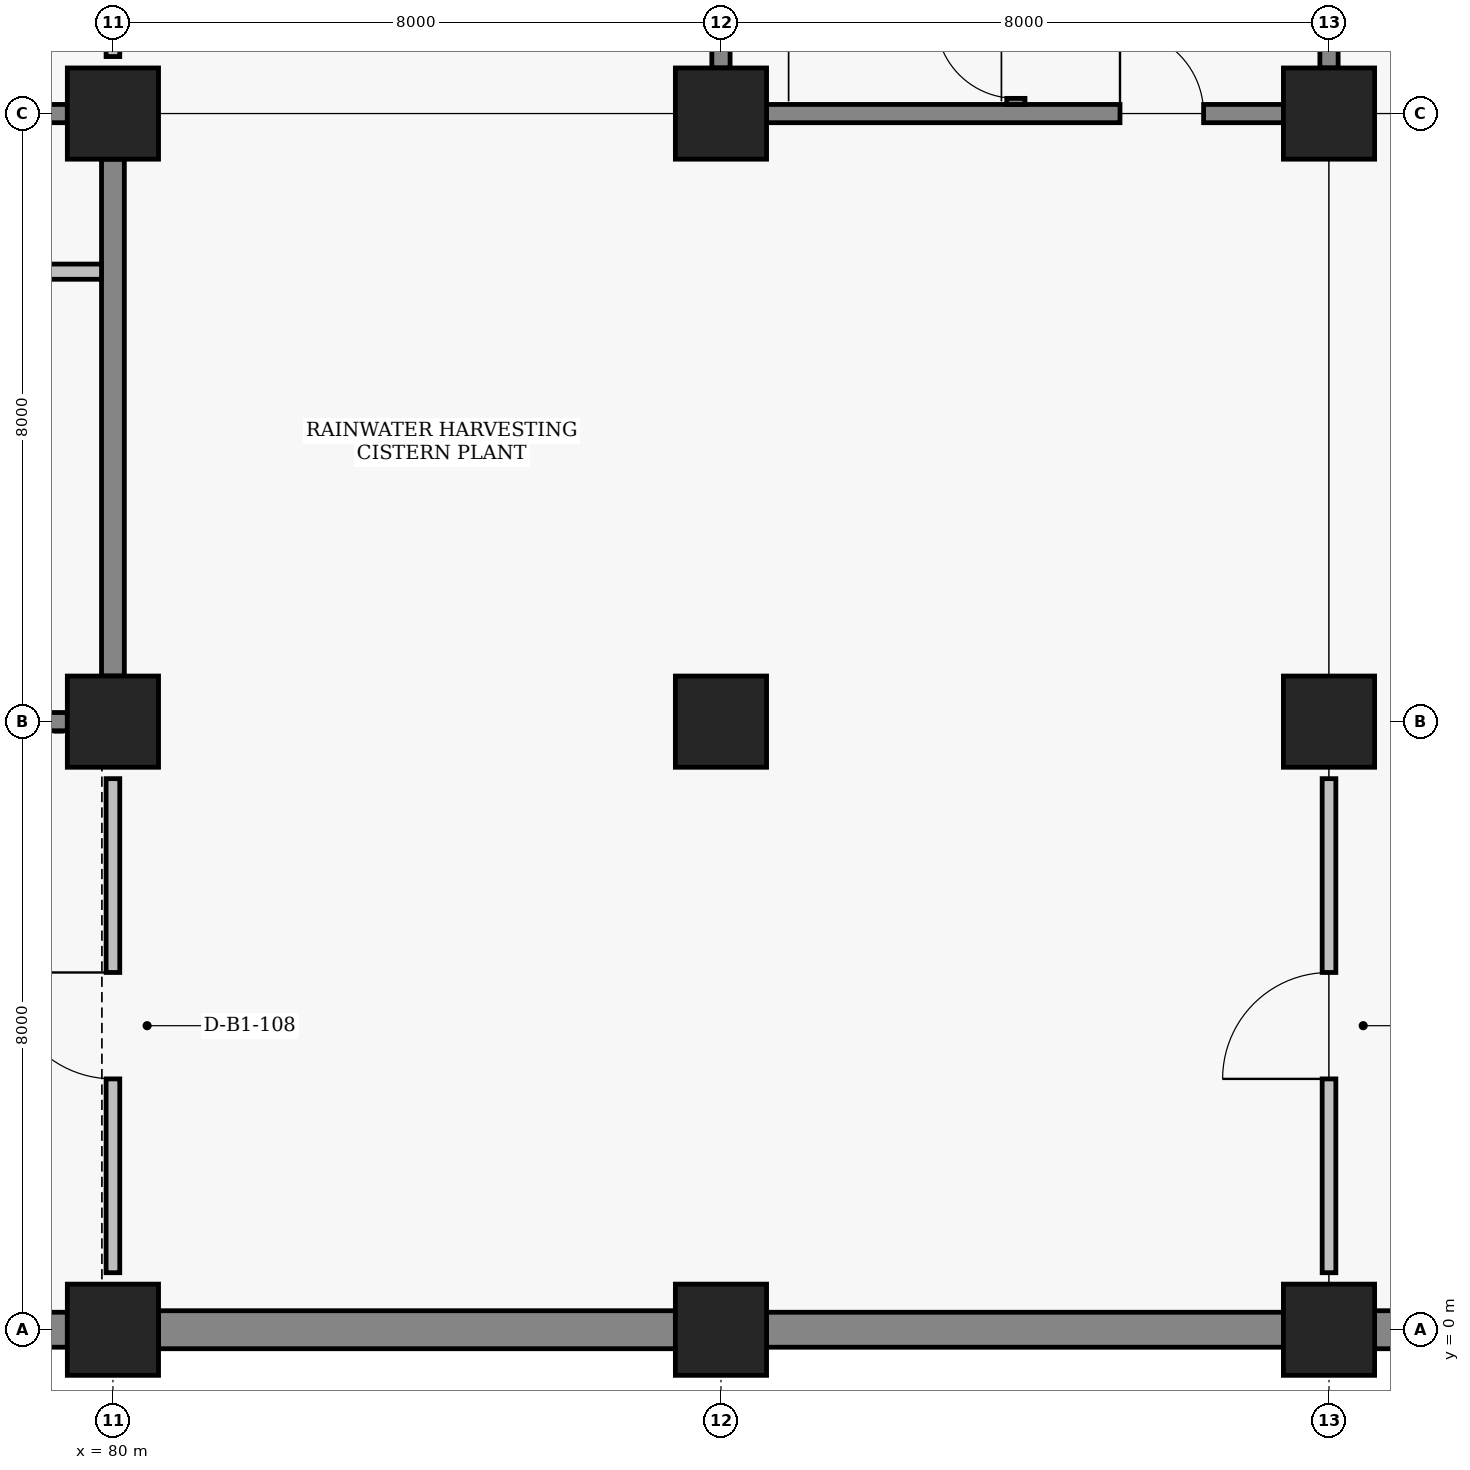
"""IFC4 building model, lengths in metres.
Left out: names, types, materials, properties, quantities, classifications, styles, units other than length and angle.
Written with IfcOpenShell. Run it as: python <this file> out.ifc"""

import sys

from ifc_helpers import new_model, si_unit, direction, frame, frame_2d, origin, origin_2d, place, context, subcontext, project, spatial, rectangle, extrude, element, fill, save


model = new_model("IFC4")
c1 = context("Model", 3, precision=1e-05, world=origin(), true_north=direction((0.0, 1.0)))
c2 = subcontext(c1, "Body", "Model", "MODEL_VIEW")
j1 = project(units=[si_unit("LENGTHUNIT", "METRE"), si_unit("PLANEANGLEUNIT", "RADIAN")], contexts=[c1])
p1 = place(None, origin())
s1 = spatial("IfcSite", under=j1, at=p1, CompositionType="ELEMENT")
p2 = place(p1, origin())
s2 = spatial("IfcBuilding", under=s1, at=p2, CompositionType="ELEMENT")
p3 = place(p2, frame((0.0, 0.0, -5.4)))
s3 = spatial("IfcBuildingStorey", under=s2, at=p3, CompositionType="ELEMENT", Elevation=-5.4)
for number, where, z_axis, x_axis in (
    (1, (80.0, 0.0, 0.0), (0.0, 0.0, 1.0), (1.0, 0.0, 0.0)),
    (2, (80.0, 8.0, 0.0), (0.0, 0.0, 1.0), (1.0, 0.0, 0.0)),
    (3, (80.0, 16.0, 0.0), (0.0, 0.0, 1.0), (1.0, 0.0, 0.0)),
    (4, (88.0, 0.0, 0.0), (0.0, 0.0, 1.0), (1.0, 0.0, 0.0)),
    (5, (88.0, 8.0, 0.0), (0.0, 0.0, 1.0), (1.0, 0.0, 0.0)),
    (6, (88.0, 16.0, 0.0), (0.0, 0.0, 1.0), (1.0, 0.0, 0.0)),
    (7, (96.0, 0.0, 0.0), (0.0, 0.0, 1.0), (1.0, 0.0, 0.0)),
    (8, (96.0, 8.0, 0.0), (0.0, 0.0, 1.0), (1.0, 0.0, 0.0)),
    (9, (96.0, 16.0, 0.0), (0.0, 0.0, 1.0), (1.0, 0.0, 0.0)),
):
    element("IfcColumn", number, at=place(p3, frame(where, z_axis=z_axis, x_axis=x_axis)), inside=s3, PredefinedType="COLUMN", context=c2, shape_type="SweptSolid", body=[
        extrude(rectangle(XDim=1.2, YDim=1.2, at=origin_2d()), origin(), (0.0, 0.0, 1.0), 5.4),
    ])
p4 = place(p3, frame((72.6, 0.0, 0.0), z_axis=(0.0, 0.0, 1.0), x_axis=(1.0, 0.0, 0.0)))
e10 = element("IfcWall", 10, at=p4, inside=s3, PredefinedType="STANDARD", context=c2, shape_type="SweptSolid", body=[
    extrude(rectangle(XDim=6.8, YDim=0.46, at=frame_2d((3.4, 0.0))), origin(), (0.0, 0.0, 1.0), 4.29),
])
p5 = place(p3, frame((80.6, 0.0, 0.0), z_axis=(0.0, 0.0, 1.0), x_axis=(1.0, 0.0, 0.0)))
e11 = element("IfcWall", 11, at=p5, inside=s3, PredefinedType="STANDARD", context=c2, shape_type="SweptSolid", body=[
    extrude(rectangle(XDim=6.8, YDim=0.5, at=frame_2d((3.4, 0.0))), origin(), (0.0, 0.0, 1.0), 4.29),
])
p6 = place(p3, frame((88.6, 0.0, 0.0), z_axis=(0.0, 0.0, 1.0), x_axis=(1.0, 0.0, 0.0)))
e12 = element("IfcWall", 12, at=p6, inside=s3, PredefinedType="STANDARD", context=c2, shape_type="SweptSolid", body=[
    extrude(rectangle(XDim=6.8, YDim=0.46, at=frame_2d((3.4, 0.0))), origin(), (0.0, 0.0, 1.0), 4.29),
])
p7 = place(p3, frame((96.6, 0.0, 0.0), z_axis=(0.0, 0.0, 1.0), x_axis=(1.0, 0.0, 0.0)))
e13 = element("IfcWall", 13, at=p7, inside=s3, PredefinedType="STANDARD", context=c2, shape_type="SweptSolid", body=[
    extrude(rectangle(XDim=6.8, YDim=0.5, at=frame_2d((3.4, 0.0))), origin(), (0.0, 0.0, 1.0), 4.29),
])
p8 = place(p3, frame((88.6, 16.0, 0.0), z_axis=(0.0, 0.0, 1.0), x_axis=(1.0, 0.0, 0.0)))
e14 = element("IfcWall", 14, at=p8, inside=s3, PredefinedType="SHEAR", context=c2, shape_type="SweptSolid", body=[
    extrude(rectangle(XDim=6.8, YDim=0.24, at=frame_2d((3.4, 0.0))), origin(), (0.0, 0.0, 1.0), 3.64),
])
p9 = place(p8, frame((4.65, 0.0, 0.0)))
e15 = element("IfcOpeningElement", 15, at=p9, cuts=e14, PredefinedType="OPENING", context=c2, shape_type="SweptSolid", body=[
    extrude(rectangle(XDim=1.1, YDim=2.2, at=frame_2d((0.55, 1.1))), frame((0.0, 0.13, 0.0), z_axis=(0.0, -1.0, 0.0), x_axis=(1.0, 0.0, 0.0)), (0.0, 0.0, 1.0), 0.26),
])
p10 = place(p3, frame((88.0, 16.6, 0.0), z_axis=(0.0, 0.0, 1.0), x_axis=(0.0, 1.0, 0.0)))
e16 = element("IfcWall", 16, at=p10, inside=s3, PredefinedType="SHEAR", context=c2, shape_type="SweptSolid", body=[
    extrude(rectangle(XDim=6.8, YDim=0.24, at=frame_2d((3.4, 0.0))), origin(), (0.0, 0.0, 1.0), 4.39),
])
p11 = place(p3, frame((96.0, 16.6, 0.0), z_axis=(0.0, 0.0, 1.0), x_axis=(0.0, 1.0, 0.0)))
e17 = element("IfcWall", 17, at=p11, inside=s3, PredefinedType="SHEAR", context=c2, shape_type="SweptSolid", body=[
    extrude(rectangle(XDim=6.8, YDim=0.24, at=frame_2d((3.4, 0.0))), origin(), (0.0, 0.0, 1.0), 3.64),
])
p12 = place(p3, frame((91.88, 16.12, 0.0), z_axis=(0.0, 0.0, 1.0), x_axis=(0.0, 1.0, 0.0)))
e18 = element("IfcWall", 18, at=p12, inside=s3, PredefinedType="SHEAR", context=c2, shape_type="SweptSolid", body=[
    extrude(rectangle(XDim=7.76, YDim=0.24, at=frame_2d((3.88, 0.0))), origin(), (0.0, 0.0, 1.0), 4.54),
])
p13 = place(p12, frame((0.08, 0.0, 0.0)))
e19 = element("IfcOpeningElement", 19, at=p13, cuts=e18, PredefinedType="OPENING", context=c2, shape_type="SweptSolid", body=[
    extrude(rectangle(XDim=1.05, YDim=2.15, at=frame_2d((0.525, 1.075))), frame((0.0, 0.13, 0.0), z_axis=(0.0, -1.0, 0.0), x_axis=(1.0, 0.0, 0.0)), (0.0, 0.0, 1.0), 0.26),
])
p14 = place(p3, frame((72.6, 8.0, 0.0), z_axis=(0.0, 0.0, 1.0), x_axis=(1.0, 0.0, 0.0)))
e20 = element("IfcWall", 20, at=p14, inside=s3, PredefinedType="SHEAR", context=c2, shape_type="SweptSolid", body=[
    extrude(rectangle(XDim=6.8, YDim=0.24, at=frame_2d((3.4, 0.0))), origin(), (0.0, 0.0, 1.0), 4.54),
])
p15 = place(p14, frame((4.65, 0.0, 0.0)))
e21 = element("IfcOpeningElement", 21, at=p15, cuts=e20, PredefinedType="OPENING", context=c2, shape_type="SweptSolid", body=[
    extrude(rectangle(XDim=1.1, YDim=2.2, at=frame_2d((0.55, 1.1))), frame((0.0, 0.13, 0.0), z_axis=(0.0, -1.0, 0.0), x_axis=(1.0, 0.0, 0.0)), (0.0, 0.0, 1.0), 0.26),
])
p16 = place(p3, frame((72.6, 16.0, 0.0), z_axis=(0.0, 0.0, 1.0), x_axis=(1.0, 0.0, 0.0)))
e22 = element("IfcWall", 22, at=p16, inside=s3, PredefinedType="SHEAR", context=c2, shape_type="SweptSolid", body=[
    extrude(rectangle(XDim=6.8, YDim=0.24, at=frame_2d((3.4, 0.0))), origin(), (0.0, 0.0, 1.0), 4.54),
])
p17 = place(p3, frame((80.0, 8.6, 0.0), z_axis=(0.0, 0.0, 1.0), x_axis=(0.0, 1.0, 0.0)))
e23 = element("IfcWall", 23, at=p17, inside=s3, PredefinedType="SHEAR", context=c2, shape_type="SweptSolid", body=[
    extrude(rectangle(XDim=6.8, YDim=0.3, at=frame_2d((3.4, 0.0))), origin(), (0.0, 0.0, 1.0), 4.34),
])
p18 = place(p3, frame((76.03, 13.92, 0.0), z_axis=(0.0, 0.0, 1.0), x_axis=(1.0, 0.0, 0.0)))
e24 = element("IfcWall", 24, at=p18, inside=s3, PredefinedType="PARTITIONING", context=c2, shape_type="SweptSolid", body=[
    extrude(rectangle(XDim=3.82, YDim=0.2, at=frame_2d((1.91, 0.0))), origin(), (0.0, 0.0, 1.0), 4.34),
])
p19 = place(p18, frame((1.25, 0.0, 0.0)))
e25 = element("IfcOpeningElement", 25, at=p19, cuts=e24, PredefinedType="OPENING", context=c2, shape_type="SweptSolid", body=[
    extrude(rectangle(XDim=0.85, YDim=2.05, at=frame_2d((0.425, 1.025))), frame((0.0, 0.11, 0.0), z_axis=(0.0, -1.0, 0.0), x_axis=(1.0, 0.0, 0.0)), (0.0, 0.0, 1.0), 0.22),
])
p20 = place(p3, frame((80.0, 16.75, 0.0), z_axis=(0.0, 0.0, 1.0), x_axis=(0.0, 1.0, 0.0)))
e26 = element("IfcWall", 26, at=p20, inside=s3, PredefinedType="PARTITIONING", context=c2, shape_type="SweptSolid", body=[
    extrude(rectangle(XDim=6.5, YDim=0.18, at=frame_2d((3.25, 0.0))), origin(), (0.0, 0.0, 1.0), 4.39),
])
p21 = place(p20, frame((2.5, 0.0, 0.0)))
e27 = element("IfcOpeningElement", 27, at=p21, cuts=e26, PredefinedType="OPENING", context=c2, shape_type="SweptSolid", body=[
    extrude(rectangle(XDim=1.5, YDim=2.2, at=frame_2d((0.75, 1.1))), frame((0.0, 0.1, 0.0), z_axis=(0.0, -1.0, 0.0), x_axis=(1.0, 0.0, 0.0)), (0.0, 0.0, 1.0), 0.2),
])
p22 = place(p3, frame((80.0, 0.75, 0.0), z_axis=(0.0, 0.0, 1.0), x_axis=(0.0, 1.0, 0.0)))
e28 = element("IfcWall", 28, at=p22, inside=s3, PredefinedType="PARTITIONING", context=c2, shape_type="SweptSolid", body=[
    extrude(rectangle(XDim=6.5, YDim=0.18, at=frame_2d((3.25, 0.0))), origin(), (0.0, 0.0, 1.0), 4.34),
])
p23 = place(p22, frame((2.55, 0.0, 0.0)))
e29 = element("IfcOpeningElement", 29, at=p23, cuts=e28, PredefinedType="OPENING", context=c2, shape_type="SweptSolid", body=[
    extrude(rectangle(XDim=1.4, YDim=2.2, at=frame_2d((0.7, 1.1))), frame((0.0, 0.1, 0.0), z_axis=(0.0, -1.0, 0.0), x_axis=(1.0, 0.0, 0.0)), (0.0, 0.0, 1.0), 0.2),
])
p24 = place(p3, frame((96.0, 0.75, 0.0), z_axis=(0.0, 0.0, 1.0), x_axis=(0.0, 1.0, 0.0)))
e30 = element("IfcWall", 30, at=p24, inside=s3, PredefinedType="PARTITIONING", context=c2, shape_type="SweptSolid", body=[
    extrude(rectangle(XDim=6.5, YDim=0.18, at=frame_2d((3.25, 0.0))), origin(), (0.0, 0.0, 1.0), 4.34),
])
p25 = place(p24, frame((2.55, 0.0, 0.0)))
e31 = element("IfcOpeningElement", 31, at=p25, cuts=e30, PredefinedType="OPENING", context=c2, shape_type="SweptSolid", body=[
    extrude(rectangle(XDim=1.4, YDim=2.2, at=frame_2d((0.7, 1.1))), frame((0.0, 0.1, 0.0), z_axis=(0.0, -1.0, 0.0), x_axis=(1.0, 0.0, 0.0)), (0.0, 0.0, 1.0), 0.2),
])
p26 = place(p9, origin())
e32 = element("IfcDoor", 32, at=p26, inside=s3, OperationType="SINGLE_SWING_LEFT", PredefinedType="DOOR", context=c2, shape_type="SweptSolid", body=[
    extrude(rectangle(XDim=1.1, YDim=2.2, at=frame_2d((0.55, 1.1))), frame((0.0, 0.025, 0.0), z_axis=(0.0, -1.0, 0.0), x_axis=(1.0, 0.0, 0.0)), (0.0, 0.0, 1.0), 0.05),
])
fill(e15, e32)
p27 = place(p13, origin())
e33 = element("IfcDoor", 33, at=p27, inside=s3, OperationType="SINGLE_SWING_RIGHT", PredefinedType="DOOR", context=c2, shape_type="SweptSolid", body=[
    extrude(rectangle(XDim=1.05, YDim=2.15, at=frame_2d((0.525, 1.075))), frame((0.0, 0.025, 0.0), z_axis=(0.0, -1.0, 0.0), x_axis=(1.0, 0.0, 0.0)), (0.0, 0.0, 1.0), 0.05),
])
fill(e19, e33)
p28 = place(p23, origin())
e34 = element("IfcDoor", 34, at=p28, inside=s3, OperationType="SINGLE_SWING_RIGHT", PredefinedType="DOOR", context=c2, shape_type="SweptSolid", body=[
    extrude(rectangle(XDim=1.4, YDim=2.2, at=frame_2d((0.7, 1.1))), frame((0.0, 0.025, 0.0), z_axis=(0.0, -1.0, 0.0), x_axis=(1.0, 0.0, 0.0)), (0.0, 0.0, 1.0), 0.05),
])
fill(e29, e34)
p29 = place(p25, origin())
e35 = element("IfcDoor", 35, at=p29, inside=s3, OperationType="SINGLE_SWING_LEFT", PredefinedType="DOOR", context=c2, shape_type="SweptSolid", body=[
    extrude(rectangle(XDim=1.4, YDim=2.2, at=frame_2d((0.7, 1.1))), frame((0.0, 0.025, 0.0), z_axis=(0.0, -1.0, 0.0), x_axis=(1.0, 0.0, 0.0)), (0.0, 0.0, 1.0), 0.05),
])
fill(e31, e35)
save(model, sys.argv[1])
